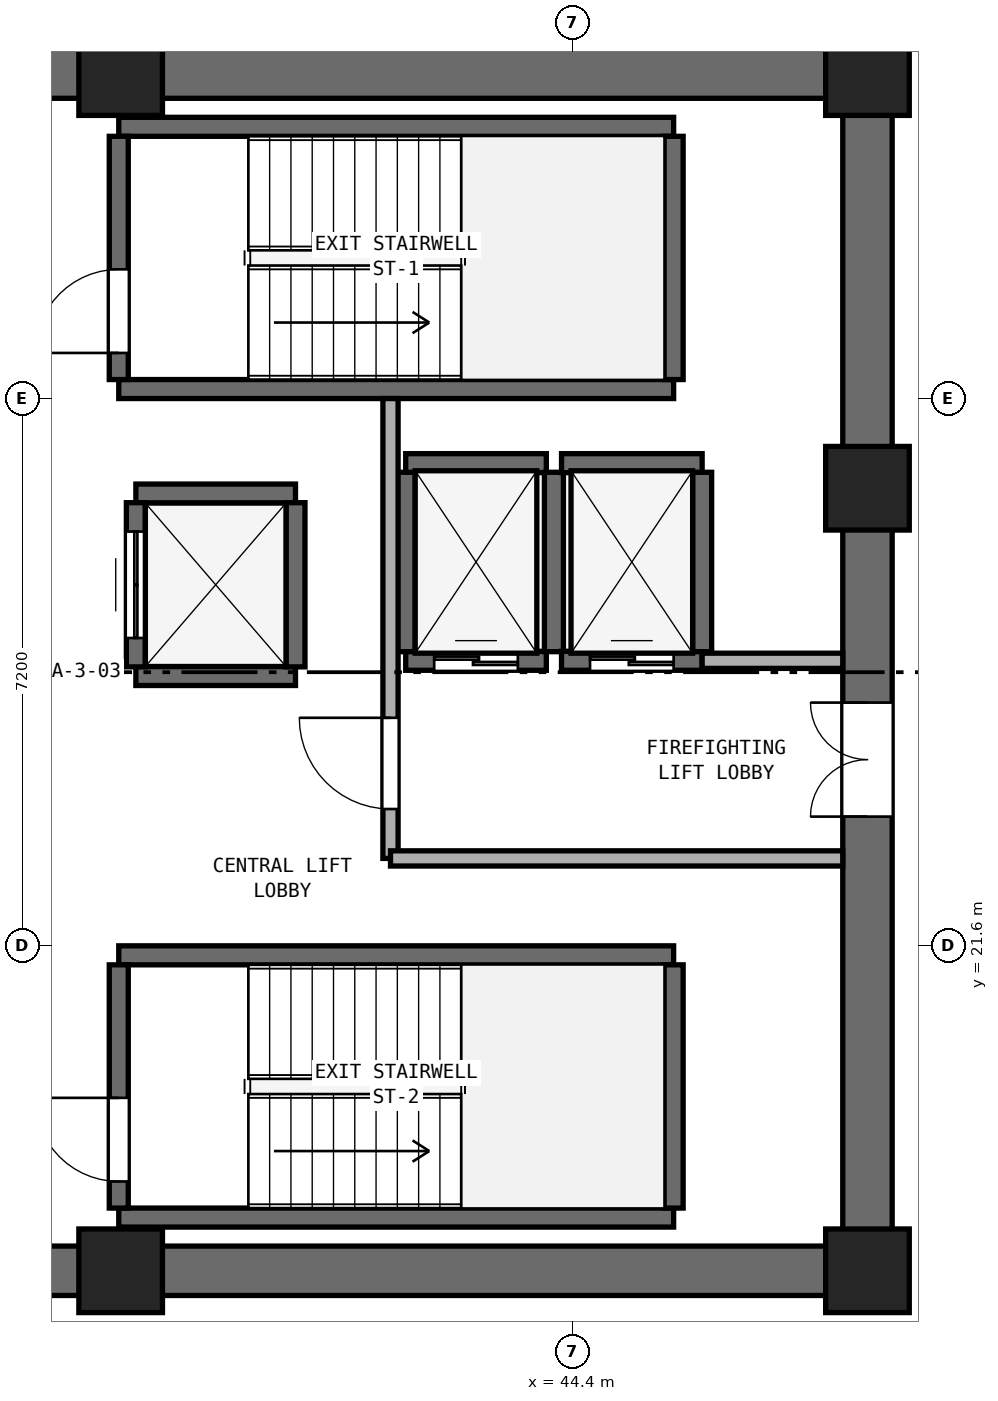
"""IFC4 building model, lengths in metres.
Left out: names, types, materials, properties, quantities, classifications, styles, units other than length and angle.
Written with IfcOpenShell. Run it as: python <this file> out.ifc"""

import sys

from ifc_helpers import new_model, si_unit, direction, frame, frame_2d, origin, origin_2d, place, context, subcontext, project, spatial, rectangle, extrude, element, fill, save


model = new_model("IFC4")
c1 = context("Model", 3, precision=1e-05, world=origin(), true_north=direction((0.0, 1.0)))
c2 = subcontext(c1, "Body", "Model", "MODEL_VIEW")
j1 = project(units=[si_unit("LENGTHUNIT", "METRE"), si_unit("PLANEANGLEUNIT", "RADIAN")], contexts=[c1])
p1 = place(None, origin())
s1 = spatial("IfcSite", under=j1, at=p1, CompositionType="ELEMENT")
p2 = place(p1, origin())
s2 = spatial("IfcBuilding", under=s1, at=p2, CompositionType="ELEMENT")
p3 = place(p2, frame((0.0, 0.0, 108.6)))
s3 = spatial("IfcBuildingStorey", under=s2, at=p3, CompositionType="ELEMENT", Elevation=108.6)
for number, where, z_axis, x_axis in (
    (1, (25.4, 17.325, 0.0), (0.0, 0.0, 1.0), (1.0, 0.0, 0.0)),
    (2, (25.4, 33.075, 0.0), (0.0, 0.0, 1.0), (1.0, 0.0, 0.0)),
):
    element("IfcWall", number, at=place(p3, frame(where, z_axis=z_axis, x_axis=x_axis)), inside=s3, PredefinedType="SHEAR", context=c2, shape_type="SweptSolid", body=[
        extrude(rectangle(XDim=23.2, YDim=0.65, at=frame_2d((11.6, 0.0))), origin(), (0.0, 0.0, 1.0), 3.525),
    ])
p4 = place(p3, frame((48.275, 17.65, 0.0), z_axis=(0.0, 0.0, 1.0), x_axis=(0.0, 1.0, 0.0)))
e3 = element("IfcWall", 3, at=p4, inside=s3, PredefinedType="SHEAR", context=c2, shape_type="SweptSolid", body=[
    extrude(rectangle(XDim=15.1, YDim=0.65, at=frame_2d((7.55, 0.0))), origin(), (0.0, 0.0, 1.0), 3.525),
])
p5 = place(p4, frame((5.65, 0.0, 0.0)))
e4 = element("IfcOpeningElement", 4, at=p5, cuts=e3, PredefinedType="OPENING", context=c2, shape_type="SweptSolid", body=[
    extrude(rectangle(XDim=1.5, YDim=2.15, at=frame_2d((0.75, 1.075))), frame((0.0, 0.335, 0.0), z_axis=(0.0, -1.0, 0.0), x_axis=(1.0, 0.0, 0.0)), (0.0, 0.0, 1.0), 0.67),
])
for number, where, z_axis, x_axis in (
    (5, (38.45, 17.325, 0.0), (0.0, 0.0, 1.0), (1.0, 0.0, 0.0)),
    (6, (48.275, 17.325, 0.0), (0.0, 0.0, 1.0), (1.0, 0.0, 0.0)),
    (7, (48.275, 27.62, 0.0), (0.0, 0.0, 1.0), (1.0, 0.0, 0.0)),
    (8, (48.275, 33.075, 0.0), (0.0, 0.0, 1.0), (1.0, 0.0, 0.0)),
    (9, (38.45, 33.075, 0.0), (0.0, 0.0, 1.0), (1.0, 0.0, 0.0)),
):
    element("IfcColumn", number, at=place(p3, frame(where, z_axis=z_axis, x_axis=x_axis)), inside=s3, PredefinedType="PILASTER", context=c2, shape_type="SweptSolid", body=[
        extrude(rectangle(XDim=1.1, YDim=1.1, at=origin_2d()), origin(), (0.0, 0.0, 1.0), 3.8),
    ])
for number, where, z_axis, x_axis in (
    (10, (38.425, 28.925, 0.0), (0.0, 0.0, 1.0), (1.0, 0.0, 0.0)),
    (11, (38.425, 32.375, 0.0), (0.0, 0.0, 1.0), (1.0, 0.0, 0.0)),
):
    element("IfcWall", number, at=place(p3, frame(where, z_axis=z_axis, x_axis=x_axis)), inside=s3, PredefinedType="SHEAR", context=c2, shape_type="SweptSolid", body=[
        extrude(rectangle(XDim=7.3, YDim=0.25, at=frame_2d((3.65, 0.0))), origin(), (0.0, 0.0, 1.0), 3.525),
    ])
p6 = place(p3, frame((38.425, 29.05, 0.0), z_axis=(0.0, 0.0, 1.0), x_axis=(0.0, 1.0, 0.0)))
e12 = element("IfcWall", 12, at=p6, inside=s3, PredefinedType="SHEAR", context=c2, shape_type="SweptSolid", body=[
    extrude(rectangle(XDim=3.2, YDim=0.25, at=frame_2d((1.6, 0.0))), origin(), (0.0, 0.0, 1.0), 3.525),
])
p7 = place(p6, frame((0.35, 0.0, 0.0)))
e13 = element("IfcOpeningElement", 13, at=p7, cuts=e12, PredefinedType="OPENING", context=c2, shape_type="SweptSolid", body=[
    extrude(rectangle(XDim=1.1, YDim=2.15, at=frame_2d((0.55, 1.075))), frame((0.0, 0.135, 0.0), z_axis=(0.0, -1.0, 0.0), x_axis=(1.0, 0.0, 0.0)), (0.0, 0.0, 1.0), 0.27),
])
p8 = place(p3, frame((45.725, 29.05, 0.0), z_axis=(0.0, 0.0, 1.0), x_axis=(0.0, 1.0, 0.0)))
e14 = element("IfcWall", 14, at=p8, inside=s3, PredefinedType="SHEAR", context=c2, shape_type="SweptSolid", body=[
    extrude(rectangle(XDim=3.2, YDim=0.25, at=frame_2d((1.6, 0.0))), origin(), (0.0, 0.0, 1.0), 3.525),
])
for number, where, z_axis, x_axis in (
    (15, (38.425, 18.025, 0.0), (0.0, 0.0, 1.0), (1.0, 0.0, 0.0)),
    (16, (38.425, 21.475, 0.0), (0.0, 0.0, 1.0), (1.0, 0.0, 0.0)),
):
    element("IfcWall", number, at=place(p3, frame(where, z_axis=z_axis, x_axis=x_axis)), inside=s3, PredefinedType="SHEAR", context=c2, shape_type="SweptSolid", body=[
        extrude(rectangle(XDim=7.3, YDim=0.25, at=frame_2d((3.65, 0.0))), origin(), (0.0, 0.0, 1.0), 3.525),
    ])
p9 = place(p3, frame((38.425, 18.15, 0.0), z_axis=(0.0, 0.0, 1.0), x_axis=(0.0, 1.0, 0.0)))
e17 = element("IfcWall", 17, at=p9, inside=s3, PredefinedType="SHEAR", context=c2, shape_type="SweptSolid", body=[
    extrude(rectangle(XDim=3.2, YDim=0.25, at=frame_2d((1.6, 0.0))), origin(), (0.0, 0.0, 1.0), 3.525),
])
p10 = place(p9, frame((0.35, 0.0, 0.0)))
e18 = element("IfcOpeningElement", 18, at=p10, cuts=e17, PredefinedType="OPENING", context=c2, shape_type="SweptSolid", body=[
    extrude(rectangle(XDim=1.1, YDim=2.15, at=frame_2d((0.55, 1.075))), frame((0.0, 0.135, 0.0), z_axis=(0.0, -1.0, 0.0), x_axis=(1.0, 0.0, 0.0)), (0.0, 0.0, 1.0), 0.27),
])
p11 = place(p3, frame((45.725, 18.15, 0.0), z_axis=(0.0, 0.0, 1.0), x_axis=(0.0, 1.0, 0.0)))
e19 = element("IfcWall", 19, at=p11, inside=s3, PredefinedType="SHEAR", context=c2, shape_type="SweptSolid", body=[
    extrude(rectangle(XDim=3.2, YDim=0.25, at=frame_2d((1.6, 0.0))), origin(), (0.0, 0.0, 1.0), 3.525),
])
p12 = place(p3, frame((42.2, 25.35, 0.0), z_axis=(0.0, 0.0, 1.0), x_axis=(1.0, 0.0, 0.0)))
e20 = element("IfcWall", 20, at=p12, inside=s3, PredefinedType="SHEAR", context=c2, shape_type="SweptSolid", body=[
    extrude(rectangle(XDim=1.85, YDim=0.25, at=frame_2d((0.925, 0.0))), origin(), (0.0, 0.0, 1.0), 3.525),
])
p13 = place(p12, frame((0.375, 0.0, 0.0)))
e21 = element("IfcOpeningElement", 21, at=p13, cuts=e20, PredefinedType="OPENING", context=c2, shape_type="SweptSolid", body=[
    extrude(rectangle(XDim=1.1, YDim=2.15, at=frame_2d((0.55, 1.075))), frame((0.0, 0.135, 0.0), z_axis=(0.0, -1.0, 0.0), x_axis=(1.0, 0.0, 0.0)), (0.0, 0.0, 1.0), 0.27),
])
p14 = place(p3, frame((42.2, 27.95, 0.0), z_axis=(0.0, 0.0, 1.0), x_axis=(1.0, 0.0, 0.0)))
e22 = element("IfcWall", 22, at=p14, inside=s3, PredefinedType="SHEAR", context=c2, shape_type="SweptSolid", body=[
    extrude(rectangle(XDim=1.85, YDim=0.25, at=frame_2d((0.925, 0.0))), origin(), (0.0, 0.0, 1.0), 3.525),
])
for number, where, z_axis, x_axis in (
    (23, (42.2, 25.47, 0.0), (0.0, 0.0, 1.0), (0.0, 1.0, 0.0)),
    (24, (44.15, 25.47, 0.0), (0.0, 0.0, 1.0), (0.0, 1.0, 0.0)),
):
    element("IfcWall", number, at=place(p3, frame(where, z_axis=z_axis, x_axis=x_axis)), inside=s3, PredefinedType="SHEAR", context=c2, shape_type="SweptSolid", body=[
        extrude(rectangle(XDim=2.36, YDim=0.25, at=frame_2d((1.18, 0.0))), origin(), (0.0, 0.0, 1.0), 3.525),
    ])
p15 = place(p3, frame((44.25, 25.35, 0.0), z_axis=(0.0, 0.0, 1.0), x_axis=(1.0, 0.0, 0.0)))
e25 = element("IfcWall", 25, at=p15, inside=s3, PredefinedType="SHEAR", context=c2, shape_type="SweptSolid", body=[
    extrude(rectangle(XDim=1.85, YDim=0.25, at=frame_2d((0.925, 0.0))), origin(), (0.0, 0.0, 1.0), 3.525),
])
p16 = place(p15, frame((0.375, 0.0, 0.0)))
e26 = element("IfcOpeningElement", 26, at=p16, cuts=e25, PredefinedType="OPENING", context=c2, shape_type="SweptSolid", body=[
    extrude(rectangle(XDim=1.1, YDim=2.15, at=frame_2d((0.55, 1.075))), frame((0.0, 0.135, 0.0), z_axis=(0.0, -1.0, 0.0), x_axis=(1.0, 0.0, 0.0)), (0.0, 0.0, 1.0), 0.27),
])
p17 = place(p3, frame((44.25, 27.95, 0.0), z_axis=(0.0, 0.0, 1.0), x_axis=(1.0, 0.0, 0.0)))
e27 = element("IfcWall", 27, at=p17, inside=s3, PredefinedType="SHEAR", context=c2, shape_type="SweptSolid", body=[
    extrude(rectangle(XDim=1.85, YDim=0.25, at=frame_2d((0.925, 0.0))), origin(), (0.0, 0.0, 1.0), 3.525),
])
p18 = place(p3, frame((46.1, 25.47, 0.0), z_axis=(0.0, 0.0, 1.0), x_axis=(0.0, 1.0, 0.0)))
e28 = element("IfcWall", 28, at=p18, inside=s3, PredefinedType="SHEAR", context=c2, shape_type="SweptSolid", body=[
    extrude(rectangle(XDim=2.36, YDim=0.25, at=frame_2d((1.18, 0.0))), origin(), (0.0, 0.0, 1.0), 3.525),
])
for number, where, z_axis, x_axis in (
    (29, (38.65, 25.15, 0.0), (0.0, 0.0, 1.0), (1.0, 0.0, 0.0)),
    (30, (38.65, 27.55, 0.0), (0.0, 0.0, 1.0), (1.0, 0.0, 0.0)),
):
    element("IfcWall", number, at=place(p3, frame(where, z_axis=z_axis, x_axis=x_axis)), inside=s3, PredefinedType="SHEAR", context=c2, shape_type="SweptSolid", body=[
        extrude(rectangle(XDim=2.1, YDim=0.25, at=frame_2d((1.05, 0.0))), origin(), (0.0, 0.0, 1.0), 3.525),
    ])
p19 = place(p3, frame((38.65, 25.27, 0.0), z_axis=(0.0, 0.0, 1.0), x_axis=(0.0, 1.0, 0.0)))
e31 = element("IfcWall", 31, at=p19, inside=s3, PredefinedType="SHEAR", context=c2, shape_type="SweptSolid", body=[
    extrude(rectangle(XDim=2.16, YDim=0.25, at=frame_2d((1.08, 0.0))), origin(), (0.0, 0.0, 1.0), 3.525),
])
p20 = place(p19, frame((0.38, 0.0, 0.0)))
e32 = element("IfcOpeningElement", 32, at=p20, cuts=e31, PredefinedType="OPENING", context=c2, shape_type="SweptSolid", body=[
    extrude(rectangle(XDim=1.4, YDim=2.2, at=frame_2d((0.7, 1.1))), frame((0.0, 0.135, 0.0), z_axis=(0.0, -1.0, 0.0), x_axis=(1.0, 0.0, 0.0)), (0.0, 0.0, 1.0), 0.27),
])
p21 = place(p3, frame((40.75, 25.27, 0.0), z_axis=(0.0, 0.0, 1.0), x_axis=(0.0, 1.0, 0.0)))
e33 = element("IfcWall", 33, at=p21, inside=s3, PredefinedType="SHEAR", context=c2, shape_type="SweptSolid", body=[
    extrude(rectangle(XDim=2.16, YDim=0.25, at=frame_2d((1.08, 0.0))), origin(), (0.0, 0.0, 1.0), 3.525),
])
p22 = place(p3, frame((42.0, 22.75, 0.0), z_axis=(0.0, 0.0, 1.0), x_axis=(0.0, 1.0, 0.0)))
e34 = element("IfcWall", 34, at=p22, inside=s3, PredefinedType="SOLIDWALL", context=c2, shape_type="SweptSolid", body=[
    extrude(rectangle(XDim=6.05, YDim=0.2, at=frame_2d((3.025, 0.0))), origin(), (0.0, 0.0, 1.0), 3.525),
])
p23 = place(p22, frame((0.65, 0.0, 0.0)))
e35 = element("IfcOpeningElement", 35, at=p23, cuts=e34, PredefinedType="OPENING", context=c2, shape_type="SweptSolid", body=[
    extrude(rectangle(XDim=1.2, YDim=2.15, at=frame_2d((0.6, 1.075))), frame((0.0, 0.11, 0.0), z_axis=(0.0, -1.0, 0.0), x_axis=(1.0, 0.0, 0.0)), (0.0, 0.0, 1.0), 0.22),
])
p24 = place(p3, frame((42.0, 22.75, 0.0), z_axis=(0.0, 0.0, 1.0), x_axis=(1.0, 0.0, 0.0)))
e36 = element("IfcWall", 36, at=p24, inside=s3, PredefinedType="SOLIDWALL", context=c2, shape_type="SweptSolid", body=[
    extrude(rectangle(XDim=5.95, YDim=0.2, at=frame_2d((2.975, 0.0))), origin(), (0.0, 0.0, 1.0), 3.525),
])
p25 = place(p3, frame((46.1, 25.35, 0.0), z_axis=(0.0, 0.0, 1.0), x_axis=(1.0, 0.0, 0.0)))
e37 = element("IfcWall", 37, at=p25, inside=s3, PredefinedType="SOLIDWALL", context=c2, shape_type="SweptSolid", body=[
    extrude(rectangle(XDim=1.85, YDim=0.2, at=frame_2d((0.925, 0.0))), origin(), (0.0, 0.0, 1.0), 3.525),
])
p26 = place(p7, origin())
e38 = element("IfcDoor", 38, at=p26, inside=s3, OperationType="SINGLE_SWING_LEFT", PredefinedType="DOOR", context=c2, shape_type="SweptSolid", body=[
    extrude(rectangle(XDim=1.1, YDim=2.15, at=frame_2d((0.55, 1.075))), frame((0.0, 0.025, 0.0), z_axis=(0.0, -1.0, 0.0), x_axis=(1.0, 0.0, 0.0)), (0.0, 0.0, 1.0), 0.05),
])
fill(e13, e38)
p27 = place(p10, origin())
e39 = element("IfcDoor", 39, at=p27, inside=s3, OperationType="SINGLE_SWING_RIGHT", PredefinedType="DOOR", context=c2, shape_type="SweptSolid", body=[
    extrude(rectangle(XDim=1.1, YDim=2.15, at=frame_2d((0.55, 1.075))), frame((0.0, 0.025, 0.0), z_axis=(0.0, -1.0, 0.0), x_axis=(1.0, 0.0, 0.0)), (0.0, 0.0, 1.0), 0.05),
])
fill(e18, e39)
p28 = place(p13, origin())
e40 = element("IfcDoor", 40, at=p28, inside=s3, OperationType="DOUBLE_DOOR_SLIDING", PredefinedType="DOOR", context=c2, shape_type="SweptSolid", body=[
    extrude(rectangle(XDim=1.1, YDim=2.15, at=frame_2d((0.55, 1.075))), frame((0.0, 0.025, 0.0), z_axis=(0.0, -1.0, 0.0), x_axis=(1.0, 0.0, 0.0)), (0.0, 0.0, 1.0), 0.05),
])
fill(e21, e40)
p29 = place(p16, origin())
e41 = element("IfcDoor", 41, at=p29, inside=s3, OperationType="DOUBLE_DOOR_SLIDING", PredefinedType="DOOR", context=c2, shape_type="SweptSolid", body=[
    extrude(rectangle(XDim=1.1, YDim=2.15, at=frame_2d((0.55, 1.075))), frame((0.0, 0.025, 0.0), z_axis=(0.0, -1.0, 0.0), x_axis=(1.0, 0.0, 0.0)), (0.0, 0.0, 1.0), 0.05),
])
fill(e26, e41)
p30 = place(p20, origin())
e42 = element("IfcDoor", 42, at=p30, inside=s3, OperationType="DOUBLE_DOOR_SLIDING", PredefinedType="DOOR", context=c2, shape_type="SweptSolid", body=[
    extrude(rectangle(XDim=1.4, YDim=2.2, at=frame_2d((0.7, 1.1))), frame((0.0, 0.025, 0.0), z_axis=(0.0, -1.0, 0.0), x_axis=(1.0, 0.0, 0.0)), (0.0, 0.0, 1.0), 0.05),
])
fill(e32, e42)
p31 = place(p23, origin())
e43 = element("IfcDoor", 43, at=p31, inside=s3, OperationType="SINGLE_SWING_RIGHT", PredefinedType="DOOR", context=c2, shape_type="SweptSolid", body=[
    extrude(rectangle(XDim=1.2, YDim=2.15, at=frame_2d((0.6, 1.075))), frame((0.0, 0.025, 0.0), z_axis=(0.0, -1.0, 0.0), x_axis=(1.0, 0.0, 0.0)), (0.0, 0.0, 1.0), 0.05),
])
fill(e35, e43)
p32 = place(p5, origin())
e44 = element("IfcDoor", 44, at=p32, inside=s3, OperationType="DOUBLE_DOOR_SINGLE_SWING", PredefinedType="DOOR", context=c2, shape_type="SweptSolid", body=[
    extrude(rectangle(XDim=1.5, YDim=2.15, at=frame_2d((0.75, 1.075))), frame((0.0, 0.025, 0.0), z_axis=(0.0, -1.0, 0.0), x_axis=(1.0, 0.0, 0.0)), (0.0, 0.0, 1.0), 0.05),
])
fill(e4, e44)
save(model, sys.argv[1])
